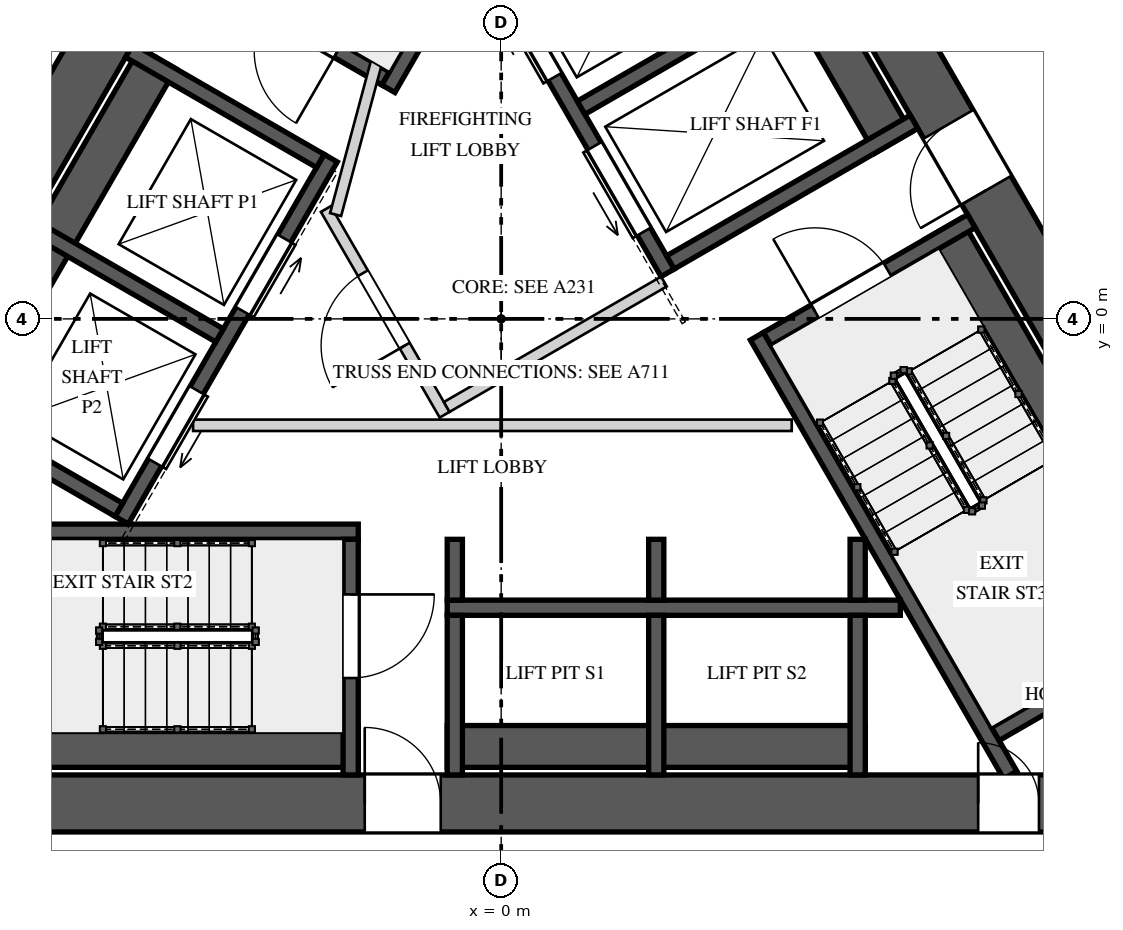
"""IFC4 building model, lengths in metres.
Left out: names, types, materials, properties, quantities, classifications, styles, units other than length and angle.
Written with IfcOpenShell. Run it as: python <this file> out.ifc"""

import sys

from ifc_helpers import new_model, si_unit, direction, frame, frame_2d, origin, place, context, subcontext, project, spatial, rectangle, extrude, element, fill, save


model = new_model("IFC4")
c1 = context("Model", 3, precision=1e-05, world=origin(), true_north=direction((0.0, 1.0)))
c2 = subcontext(c1, "Body", "Model", "MODEL_VIEW")
j1 = project(units=[si_unit("LENGTHUNIT", "METRE"), si_unit("PLANEANGLEUNIT", "RADIAN")], contexts=[c1])
p1 = place(None, origin())
s1 = spatial("IfcSite", under=j1, at=p1, CompositionType="ELEMENT")
p2 = place(p1, origin())
s2 = spatial("IfcBuilding", under=s1, at=p2, CompositionType="ELEMENT")
p3 = place(p2, frame((0.0, 0.0, 232.0)))
s3 = spatial("IfcBuildingStorey", under=s2, at=p3, CompositionType="ELEMENT", Elevation=232.0)
p4 = place(p3, frame((-1.227, 10.625, 0.0), z_axis=(0.0, 0.0, 1.0), x_axis=(-0.500002161919, -0.866024155596, 0.0)))
e1 = element("IfcWall", 1, at=p4, inside=s3, PredefinedType="SHEAR", context=c2, shape_type="SweptSolid", body=[
    extrude(rectangle(XDim=17.176, YDim=0.75, at=frame_2d((8.588, 0.0))), origin(), (0.0, 0.0, 1.0), 5.2),
])
p5 = place(p4, frame((6.793, 0.0, 0.0)))
e2 = element("IfcOpeningElement", 2, at=p5, cuts=e1, PredefinedType="OPENING", context=c2, shape_type="SweptSolid", body=[
    extrude(rectangle(XDim=1.0, YDim=2.4, at=frame_2d((0.5, 1.2))), frame((0.0, 0.385, 0.0), z_axis=(0.0, -1.0, 0.0), x_axis=(1.0, 0.0, 0.0)), (0.0, 0.0, 1.0), 0.77),
])
p6 = place(p3, frame((-8.588, -6.375, 0.0), z_axis=(0.0, 0.0, 1.0), x_axis=(1.0, 0.0, 0.0)))
e3 = element("IfcWall", 3, at=p6, inside=s3, PredefinedType="SHEAR", context=c2, shape_type="SweptSolid", body=[
    extrude(rectangle(XDim=17.176, YDim=0.75, at=frame_2d((8.588, 0.0))), origin(), (0.0, 0.0, 1.0), 5.2),
])
p7 = place(p6, frame((6.793, 0.0, 0.0)))
e4 = element("IfcOpeningElement", 4, at=p7, cuts=e3, PredefinedType="OPENING", context=c2, shape_type="SweptSolid", body=[
    extrude(rectangle(XDim=1.0, YDim=2.4, at=frame_2d((0.5, 1.2))), frame((0.0, 0.385, 0.0), z_axis=(0.0, -1.0, 0.0), x_axis=(1.0, 0.0, 0.0)), (0.0, 0.0, 1.0), 0.77),
])
p8 = place(p6, frame((14.864, 0.0, 0.0)))
e5 = element("IfcOpeningElement", 5, at=p8, cuts=e3, PredefinedType="OPENING", context=c2, shape_type="SweptSolid", body=[
    extrude(rectangle(XDim=0.8, YDim=2.1, at=frame_2d((0.4, 1.05))), frame((0.0, 0.385, 0.0), z_axis=(0.0, -1.0, 0.0), x_axis=(1.0, 0.0, 0.0)), (0.0, 0.0, 1.0), 0.77),
])
p9 = place(p3, frame((9.815, -4.25, 0.0), z_axis=(0.0, 0.0, 1.0), x_axis=(-0.500002161919, 0.866024155596, 0.0)))
e6 = element("IfcWall", 6, at=p9, inside=s3, PredefinedType="SHEAR", context=c2, shape_type="SweptSolid", body=[
    extrude(rectangle(XDim=17.176, YDim=0.75, at=frame_2d((8.588, 0.0))), origin(), (0.0, 0.0, 1.0), 5.2),
])
p10 = place(p9, frame((6.863, 0.0, 0.0)))
e7 = element("IfcOpeningElement", 7, at=p10, cuts=e6, PredefinedType="OPENING", context=c2, shape_type="SweptSolid", body=[
    extrude(rectangle(XDim=1.0, YDim=2.4, at=frame_2d((0.5, 1.2))), frame((0.0, 0.385, 0.0), z_axis=(0.0, -1.0, 0.0), x_axis=(1.0, 0.0, 0.0)), (0.0, 0.0, 1.0), 0.77),
])
p11 = place(p9, frame((14.382, 0.0, 0.0)))
e8 = element("IfcOpeningElement", 8, at=p11, cuts=e6, PredefinedType="OPENING", context=c2, shape_type="SweptSolid", body=[
    extrude(rectangle(XDim=0.8, YDim=2.1, at=frame_2d((0.4, 1.05))), frame((0.0, 0.385, 0.0), z_axis=(0.0, -1.0, 0.0), x_axis=(1.0, 0.0, 0.0)), (0.0, 0.0, 1.0), 0.77),
])
p12 = place(p3, frame((1.847, 8.8, 0.0), z_axis=(0.0, 0.0, 1.0), x_axis=(-0.499980354584, -0.866036745774, 0.0)))
e9 = element("IfcWall", 9, at=p12, inside=s3, PredefinedType="SOLIDWALL", context=c2, shape_type="SweptSolid", body=[
    extrude(rectangle(XDim=6.665, YDim=0.2, at=frame_2d((3.333, 0.0))), origin(), (0.0, 0.0, 1.0), 4.85),
])
p13 = place(p3, frame((-1.521, 3.165, 0.0), z_axis=(0.0, 0.0, 1.0), x_axis=(-0.86600983753, 0.500026960575, 0.0)))
e10 = element("IfcWall", 10, at=p13, inside=s3, PredefinedType="SOLIDWALL", context=c2, shape_type="SweptSolid", body=[
    extrude(rectangle(XDim=3.1, YDim=0.2, at=frame_2d((1.55, 0.0))), origin(), (0.0, 0.0, 1.0), 4.85),
])
p14 = place(p13, frame((0.725, 0.0, 0.0)))
e11 = element("IfcOpeningElement", 11, at=p14, cuts=e10, PredefinedType="OPENING", context=c2, shape_type="SweptSolid", body=[
    extrude(rectangle(XDim=1.1, YDim=2.4, at=frame_2d((0.55, 1.2))), frame((0.0, 0.11, 0.0), z_axis=(0.0, -1.0, 0.0), x_axis=(1.0, 0.0, 0.0)), (0.0, 0.0, 1.0), 0.22),
])
p15 = place(p3, frame((-8.08, -5.625, 0.0), z_axis=(0.0, 0.0, 1.0), x_axis=(1.0, 0.0, 0.0)))
e12 = element("IfcWall", 12, at=p15, inside=s3, PredefinedType="SOLIDWALL", context=c2, shape_type="SweptSolid", body=[
    extrude(rectangle(XDim=6.2, YDim=0.55, at=frame_2d((3.1, 0.0))), origin(), (0.0, 0.0, 1.0), 4.85),
])
p16 = place(p3, frame((-8.545, -2.8, 0.0), z_axis=(0.0, 0.0, 1.0), x_axis=(1.0, 0.0, 0.0)))
e13 = element("IfcWall", 13, at=p16, inside=s3, PredefinedType="SOLIDWALL", context=c2, shape_type="SweptSolid", body=[
    extrude(rectangle(XDim=6.665, YDim=0.2, at=frame_2d((3.333, 0.0))), origin(), (0.0, 0.0, 1.0), 4.85),
])
p17 = place(p3, frame((-1.98, -2.9, 0.0), z_axis=(0.0, 0.0, 1.0), x_axis=(0.0, -1.0, 0.0)))
e14 = element("IfcWall", 14, at=p17, inside=s3, PredefinedType="SOLIDWALL", context=c2, shape_type="SweptSolid", body=[
    extrude(rectangle(XDim=3.1, YDim=0.2, at=frame_2d((1.55, 0.0))), origin(), (0.0, 0.0, 1.0), 4.85),
])
p18 = place(p17, frame((0.725, 0.0, 0.0)))
e15 = element("IfcOpeningElement", 15, at=p18, cuts=e14, PredefinedType="OPENING", context=c2, shape_type="SweptSolid", body=[
    extrude(rectangle(XDim=1.1, YDim=2.4, at=frame_2d((0.55, 1.2))), frame((0.0, 0.11, 0.0), z_axis=(0.0, -1.0, 0.0), x_axis=(1.0, 0.0, 0.0)), (0.0, 0.0, 1.0), 0.22),
])
p19 = place(p3, frame((8.911, -4.185, 0.0), z_axis=(0.0, 0.0, 1.0), x_axis=(-0.500009909098, 0.866019682689, 0.0)))
e16 = element("IfcWall", 16, at=p19, inside=s3, PredefinedType="SOLIDWALL", context=c2, shape_type="SweptSolid", body=[
    extrude(rectangle(XDim=6.2, YDim=0.55, at=frame_2d((3.1, 0.0))), origin(), (0.0, 0.0, 1.0), 4.85),
])
p20 = place(p3, frame((6.697, -6.0, 0.0), z_axis=(0.0, 0.0, 1.0), x_axis=(-0.499980354584, 0.866036745774, 0.0)))
e17 = element("IfcWall", 17, at=p20, inside=s3, PredefinedType="SOLIDWALL", context=c2, shape_type="SweptSolid", body=[
    extrude(rectangle(XDim=6.665, YDim=0.2, at=frame_2d((3.333, 0.0))), origin(), (0.0, 0.0, 1.0), 4.85),
])
p21 = place(p3, frame((6.501, -5.461, 0.0), z_axis=(0.0, 0.0, 1.0), x_axis=(0.86600983753, 0.500026960575, 0.0)))
e18 = element("IfcWall", 18, at=p21, inside=s3, PredefinedType="SOLIDWALL", context=c2, shape_type="SweptSolid", body=[
    extrude(rectangle(XDim=3.1, YDim=0.2, at=frame_2d((1.55, 0.0))), origin(), (0.0, 0.0, 1.0), 4.85),
])
p22 = place(p3, frame((3.501, -0.265, 0.0), z_axis=(0.0, 0.0, 1.0), x_axis=(0.866043940782, 0.499967891604, 0.0)))
e19 = element("IfcWall", 19, at=p22, inside=s3, PredefinedType="SOLIDWALL", context=c2, shape_type="SweptSolid", body=[
    extrude(rectangle(XDim=3.1, YDim=0.2, at=frame_2d((1.55, 0.0))), origin(), (0.0, 0.0, 1.0), 4.85),
])
p23 = place(p22, frame((0.725, 0.0, 0.0)))
e20 = element("IfcOpeningElement", 20, at=p23, cuts=e19, PredefinedType="OPENING", context=c2, shape_type="SweptSolid", body=[
    extrude(rectangle(XDim=1.1, YDim=2.4, at=frame_2d((0.55, 1.2))), frame((0.0, 0.11, 0.0), z_axis=(0.0, -1.0, 0.0), x_axis=(1.0, 0.0, 0.0)), (0.0, 0.0, 1.0), 0.22),
])
p24 = place(p3, frame((-2.243, 2.115, 0.0), z_axis=(0.0, 0.0, 1.0), x_axis=(-0.499996545922, -0.866027397988, 0.0)))
e21 = element("IfcWall", 21, at=p24, inside=s3, PredefinedType="SOLIDWALL", context=c2, shape_type="SweptSolid", body=[
    extrude(rectangle(XDim=5.5, YDim=0.2, at=frame_2d((2.75, 0.0))), origin(), (0.0, 0.0, 1.0), 4.85),
])
p25 = place(p24, frame((1.22, 0.0, 0.0)))
e22 = element("IfcOpeningElement", 22, at=p25, cuts=e21, PredefinedType="OPENING", context=c2, shape_type="SweptSolid", body=[
    extrude(rectangle(XDim=1.1, YDim=2.1, at=frame_2d((0.55, 1.05))), frame((0.0, 0.11, 0.0), z_axis=(0.0, -1.0, 0.0), x_axis=(1.0, 0.0, 0.0)), (0.0, 0.0, 1.0), 0.22),
])
p26 = place(p24, frame((3.525, 0.0, 0.0)))
e23 = element("IfcOpeningElement", 23, at=p26, cuts=e21, PredefinedType="OPENING", context=c2, shape_type="SweptSolid", body=[
    extrude(rectangle(XDim=1.1, YDim=2.1, at=frame_2d((0.55, 1.05))), frame((0.0, 0.11, 0.0), z_axis=(0.0, -1.0, 0.0), x_axis=(1.0, 0.0, 0.0)), (0.0, 0.0, 1.0), 0.22),
])
p27 = place(p3, frame((-4.516, 3.427, 0.0), z_axis=(0.0, 0.0, 1.0), x_axis=(-0.499996545922, -0.866027397988, 0.0)))
e24 = element("IfcWall", 24, at=p27, inside=s3, PredefinedType="SOLIDWALL", context=c2, shape_type="SweptSolid", body=[
    extrude(rectangle(XDim=5.5, YDim=0.55, at=frame_2d((2.75, 0.0))), origin(), (0.0, 0.0, 1.0), 4.85),
])
p28 = place(p3, frame((-2.38, 2.078, 0.0), z_axis=(0.0, 0.0, 1.0), x_axis=(-0.866032775405, 0.499987231761, 0.0)))
e25 = element("IfcWall", 25, at=p28, inside=s3, PredefinedType="SOLIDWALL", context=c2, shape_type="SweptSolid", body=[
    extrude(rectangle(XDim=2.9, YDim=0.2, at=frame_2d((1.45, 0.0))), origin(), (0.0, 0.0, 1.0), 4.85),
])
p29 = place(p3, frame((-3.705, -0.217, 0.0), z_axis=(0.0, 0.0, 1.0), x_axis=(-0.865996321171, 0.50005036918, 0.0)))
e26 = element("IfcWall", 26, at=p29, inside=s3, PredefinedType="SOLIDWALL", context=c2, shape_type="SweptSolid", body=[
    extrude(rectangle(XDim=2.9, YDim=0.2, at=frame_2d((1.45, 0.0))), origin(), (0.0, 0.0, 1.0), 4.85),
])
p30 = place(p3, frame((-5.03, -2.512, 0.0), z_axis=(0.0, 0.0, 1.0), x_axis=(-0.866032775405, 0.499987231761, 0.0)))
e27 = element("IfcWall", 27, at=p30, inside=s3, PredefinedType="SOLIDWALL", context=c2, shape_type="SweptSolid", body=[
    extrude(rectangle(XDim=2.9, YDim=0.2, at=frame_2d((1.45, 0.0))), origin(), (0.0, 0.0, 1.0), 4.85),
])
p31 = place(p3, frame((-0.71, -3.8, 0.0), z_axis=(0.0, 0.0, 1.0), x_axis=(1.0, 0.0, 0.0)))
e28 = element("IfcWall", 28, at=p31, inside=s3, PredefinedType="SOLIDWALL", context=c2, shape_type="SweptSolid", body=[
    extrude(rectangle(XDim=5.961, YDim=0.2, at=frame_2d((2.981, 0.0))), origin(), (0.0, 0.0, 1.0), 4.85),
])
p32 = place(p3, frame((-0.71, -5.625, 0.0), z_axis=(0.0, 0.0, 1.0), x_axis=(1.0, 0.0, 0.0)))
e29 = element("IfcWall", 29, at=p32, inside=s3, PredefinedType="SOLIDWALL", context=c2, shape_type="SweptSolid", body=[
    extrude(rectangle(XDim=5.5, YDim=0.55, at=frame_2d((2.75, 0.0))), origin(), (0.0, 0.0, 1.0), 4.85),
])
p33 = place(p3, frame((-0.61, -3.9, 0.0), z_axis=(0.0, 0.0, 1.0), x_axis=(0.0, -1.0, 0.0)))
e30 = element("IfcWall", 30, at=p33, inside=s3, PredefinedType="SOLIDWALL", context=c2, shape_type="SweptSolid", body=[
    extrude(rectangle(XDim=2.1, YDim=0.2, at=frame_2d((1.05, 0.0))), origin(), (0.0, 0.0, 1.0), 4.85),
])
p34 = place(p3, frame((-0.61, -2.9, 0.0), z_axis=(0.0, 0.0, 1.0), x_axis=(0.0, -1.0, 0.0)))
e31 = element("IfcWall", 31, at=p34, inside=s3, PredefinedType="SOLIDWALL", context=c2, shape_type="SweptSolid", body=[
    extrude(rectangle(XDim=0.8, YDim=0.2, at=frame_2d((0.4, 0.0))), origin(), (0.0, 0.0, 1.0), 4.85),
])
p35 = place(p3, frame((2.04, -3.9, 0.0), z_axis=(0.0, 0.0, 1.0), x_axis=(0.0, -1.0, 0.0)))
e32 = element("IfcWall", 32, at=p35, inside=s3, PredefinedType="SOLIDWALL", context=c2, shape_type="SweptSolid", body=[
    extrude(rectangle(XDim=2.1, YDim=0.2, at=frame_2d((1.05, 0.0))), origin(), (0.0, 0.0, 1.0), 4.85),
])
p36 = place(p3, frame((2.04, -2.9, 0.0), z_axis=(0.0, 0.0, 1.0), x_axis=(0.0, -1.0, 0.0)))
e33 = element("IfcWall", 33, at=p36, inside=s3, PredefinedType="SOLIDWALL", context=c2, shape_type="SweptSolid", body=[
    extrude(rectangle(XDim=0.8, YDim=0.2, at=frame_2d((0.4, 0.0))), origin(), (0.0, 0.0, 1.0), 4.85),
])
p37 = place(p3, frame((4.69, -3.9, 0.0), z_axis=(0.0, 0.0, 1.0), x_axis=(0.0, -1.0, 0.0)))
e34 = element("IfcWall", 34, at=p37, inside=s3, PredefinedType="SOLIDWALL", context=c2, shape_type="SweptSolid", body=[
    extrude(rectangle(XDim=2.1, YDim=0.2, at=frame_2d((1.05, 0.0))), origin(), (0.0, 0.0, 1.0), 4.85),
])
p38 = place(p3, frame((4.69, -2.9, 0.0), z_axis=(0.0, 0.0, 1.0), x_axis=(0.0, -1.0, 0.0)))
e35 = element("IfcWall", 35, at=p38, inside=s3, PredefinedType="SOLIDWALL", context=c2, shape_type="SweptSolid", body=[
    extrude(rectangle(XDim=0.8, YDim=0.2, at=frame_2d((0.4, 0.0))), origin(), (0.0, 0.0, 1.0), 4.85),
])
p39 = place(p3, frame((2.19, 0.606, 0.0), z_axis=(0.0, 0.0, 1.0), x_axis=(-0.500002801628, 0.866023786258, 0.0)))
e36 = element("IfcWall", 36, at=p39, inside=s3, PredefinedType="SOLIDWALL", context=c2, shape_type="SweptSolid", body=[
    extrude(rectangle(XDim=4.9, YDim=0.2, at=frame_2d((2.45, 0.0))), origin(), (0.0, 0.0, 1.0), 4.85),
])
p40 = place(p39, frame((0.625, 0.0, 0.0)))
e37 = element("IfcOpeningElement", 37, at=p40, cuts=e36, PredefinedType="OPENING", context=c2, shape_type="SweptSolid", body=[
    extrude(rectangle(XDim=1.3, YDim=2.1, at=frame_2d((0.65, 1.05))), frame((0.0, 0.11, 0.0), z_axis=(0.0, -1.0, 0.0), x_axis=(1.0, 0.0, 0.0)), (0.0, 0.0, 1.0), 0.22),
])
p41 = place(p39, frame((2.975, 0.0, 0.0)))
e38 = element("IfcOpeningElement", 38, at=p41, cuts=e36, PredefinedType="OPENING", context=c2, shape_type="SweptSolid", body=[
    extrude(rectangle(XDim=1.3, YDim=2.1, at=frame_2d((0.65, 1.05))), frame((0.0, 0.11, 0.0), z_axis=(0.0, -1.0, 0.0), x_axis=(1.0, 0.0, 0.0)), (0.0, 0.0, 1.0), 0.22),
])
p42 = place(p3, frame((5.156, 2.319, 0.0), z_axis=(0.0, 0.0, 1.0), x_axis=(-0.500018594424, 0.866014668023, 0.0)))
e39 = element("IfcWall", 39, at=p42, inside=s3, PredefinedType="SOLIDWALL", context=c2, shape_type="SweptSolid", body=[
    extrude(rectangle(XDim=4.9, YDim=0.55, at=frame_2d((2.45, 0.0))), origin(), (0.0, 0.0, 1.0), 4.85),
])
for number, where, z_axis, x_axis in (
    (40, (2.227, 0.743, 0.0), (0.0, 0.0, 1.0), (0.866, 0.5, 0.0)),
    (41, (1.052, 2.778, 0.0), (0.0, 0.0, 1.0), (0.866, 0.5, 0.0)),
):
    element("IfcWall", number, at=place(p3, frame(where, z_axis=z_axis, x_axis=x_axis)), inside=s3, PredefinedType="SOLIDWALL", context=c2, shape_type="SweptSolid", body=[
        extrude(rectangle(XDim=3.7, YDim=0.2, at=frame_2d((1.85, 0.0))), origin(), (0.0, 0.0, 1.0), 4.85),
    ])
p43 = place(p3, frame((-0.744, -1.261, 0.0), z_axis=(0.0, 0.0, 1.0), x_axis=(-0.500004234368, 0.866022959057, 0.0)))
e42 = element("IfcWall", 42, at=p43, inside=s3, PredefinedType="PARTITIONING", context=c2, shape_type="SweptSolid", body=[
    extrude(rectangle(XDim=3.125, YDim=0.15, at=frame_2d((1.562, 0.0))), origin(), (0.0, 0.0, 1.0), 4.85),
])
p44 = place(p43, frame((1.05, 0.0, 0.0)))
e43 = element("IfcOpeningElement", 43, at=p44, cuts=e42, PredefinedType="OPENING", context=c2, shape_type="SweptSolid", body=[
    extrude(rectangle(XDim=1.1, YDim=2.4, at=frame_2d((0.55, 1.2))), frame((0.0, 0.085, 0.0), z_axis=(0.0, -1.0, 0.0), x_axis=(1.0, 0.0, 0.0)), (0.0, 0.0, 1.0), 0.17),
])
p45 = place(p3, frame((-0.717, -1.159, 0.0), z_axis=(0.0, 0.0, 1.0), x_axis=(0.866008176907, 0.50002983664, 0.0)))
e44 = element("IfcWall", 44, at=p45, inside=s3, PredefinedType="PARTITIONING", context=c2, shape_type="SweptSolid", body=[
    extrude(rectangle(XDim=3.3, YDim=0.15, at=frame_2d((1.65, 0.0))), origin(), (0.0, 0.0, 1.0), 4.85),
])
p46 = place(p3, frame((-2.178, 1.372, 0.0), z_axis=(0.0, 0.0, 1.0), x_axis=(0.258808958833, 0.96592852884, 0.0)))
e45 = element("IfcWall", 45, at=p46, inside=s3, PredefinedType="PARTITIONING", context=c2, shape_type="SweptSolid", body=[
    extrude(rectangle(XDim=2.903, YDim=0.15, at=frame_2d((1.451, 0.0))), origin(), (0.0, 0.0, 1.0), 4.85),
])
p47 = place(p3, frame((-4.053, -1.4, 0.0), z_axis=(0.0, 0.0, 1.0), x_axis=(1.0, 0.0, 0.0)))
e46 = element("IfcWall", 46, at=p47, inside=s3, PredefinedType="PARTITIONING", context=c2, shape_type="SweptSolid", body=[
    extrude(rectangle(XDim=7.876, YDim=0.15, at=frame_2d((3.938, 0.0))), origin(), (0.0, 0.0, 1.0), 4.85),
])
p48 = place(p3, frame((7.139, 6.135, 0.0), z_axis=(0.0, 0.0, 1.0), x_axis=(0.500006198144, -0.866021825255, 0.0)))
e47 = element("IfcWall", 47, at=p48, inside=s3, PredefinedType="SOLIDWALL", context=c2, shape_type="SweptSolid", body=[
    extrude(rectangle(XDim=5.636, YDim=0.2, at=frame_2d((2.818, 0.0))), origin(), (0.0, 0.0, 1.0), 4.85),
])
p49 = place(p48, frame((1.193, 0.0, 0.0)))
e48 = element("IfcOpeningElement", 48, at=p49, cuts=e47, PredefinedType="OPENING", context=c2, shape_type="SweptSolid", body=[
    extrude(rectangle(XDim=1.1, YDim=2.2, at=frame_2d((0.55, 1.1))), frame((0.0, 0.11, 0.0), z_axis=(0.0, -1.0, 0.0), x_axis=(1.0, 0.0, 0.0)), (0.0, 0.0, 1.0), 0.22),
])
p50 = place(p18, origin())
e49 = element("IfcDoor", 49, at=p50, inside=s3, OperationType="SINGLE_SWING_LEFT", PredefinedType="DOOR", context=c2, shape_type="SweptSolid", body=[
    extrude(rectangle(XDim=1.1, YDim=2.4, at=frame_2d((0.55, 1.2))), frame((0.0, 0.025, 0.0), z_axis=(0.0, -1.0, 0.0), x_axis=(1.0, 0.0, 0.0)), (0.0, 0.0, 1.0), 0.05),
])
fill(e15, e49)
p51 = place(p23, origin())
e50 = element("IfcDoor", 50, at=p51, inside=s3, OperationType="SINGLE_SWING_RIGHT", PredefinedType="DOOR", context=c2, shape_type="SweptSolid", body=[
    extrude(rectangle(XDim=1.1, YDim=2.4, at=frame_2d((0.55, 1.2))), frame((0.0, 0.025, 0.0), z_axis=(0.0, -1.0, 0.0), x_axis=(1.0, 0.0, 0.0)), (0.0, 0.0, 1.0), 0.05),
])
fill(e20, e50)
p52 = place(p25, origin())
e51 = element("IfcDoor", 51, at=p52, inside=s3, OperationType="SLIDING_TO_LEFT", PredefinedType="DOOR", context=c2, shape_type="SweptSolid", body=[
    extrude(rectangle(XDim=1.1, YDim=2.1, at=frame_2d((0.55, 1.05))), frame((0.0, 0.025, 0.0), z_axis=(0.0, -1.0, 0.0), x_axis=(1.0, 0.0, 0.0)), (0.0, 0.0, 1.0), 0.05),
])
fill(e22, e51)
p53 = place(p26, origin())
e52 = element("IfcDoor", 52, at=p53, inside=s3, OperationType="SLIDING_TO_RIGHT", PredefinedType="DOOR", context=c2, shape_type="SweptSolid", body=[
    extrude(rectangle(XDim=1.1, YDim=2.1, at=frame_2d((0.55, 1.05))), frame((0.0, 0.025, 0.0), z_axis=(0.0, -1.0, 0.0), x_axis=(1.0, 0.0, 0.0)), (0.0, 0.0, 1.0), 0.05),
])
fill(e23, e52)
p54 = place(p40, origin())
e53 = element("IfcDoor", 53, at=p54, inside=s3, OperationType="SLIDING_TO_LEFT", PredefinedType="DOOR", context=c2, shape_type="SweptSolid", body=[
    extrude(rectangle(XDim=1.3, YDim=2.1, at=frame_2d((0.65, 1.05))), frame((0.0, 0.025, 0.0), z_axis=(0.0, -1.0, 0.0), x_axis=(1.0, 0.0, 0.0)), (0.0, 0.0, 1.0), 0.05),
])
fill(e37, e53)
p55 = place(p41, origin())
e54 = element("IfcDoor", 54, at=p55, inside=s3, OperationType="SLIDING_TO_RIGHT", PredefinedType="DOOR", context=c2, shape_type="SweptSolid", body=[
    extrude(rectangle(XDim=1.3, YDim=2.1, at=frame_2d((0.65, 1.05))), frame((0.0, 0.025, 0.0), z_axis=(0.0, -1.0, 0.0), x_axis=(1.0, 0.0, 0.0)), (0.0, 0.0, 1.0), 0.05),
])
fill(e38, e54)
p56 = place(p44, origin())
e55 = element("IfcDoor", 55, at=p56, inside=s3, OperationType="SINGLE_SWING_LEFT", PredefinedType="DOOR", context=c2, shape_type="SweptSolid", body=[
    extrude(rectangle(XDim=1.1, YDim=2.4, at=frame_2d((0.55, 1.2))), frame((0.0, 0.025, 0.0), z_axis=(0.0, -1.0, 0.0), x_axis=(1.0, 0.0, 0.0)), (0.0, 0.0, 1.0), 0.05),
])
fill(e43, e55)
p57 = place(p7, origin())
e56 = element("IfcDoor", 56, at=p57, inside=s3, OperationType="SINGLE_SWING_LEFT", PredefinedType="DOOR", context=c2, shape_type="SweptSolid", body=[
    extrude(rectangle(XDim=1.0, YDim=2.4, at=frame_2d((0.5, 1.2))), frame((0.0, 0.025, 0.0), z_axis=(0.0, -1.0, 0.0), x_axis=(1.0, 0.0, 0.0)), (0.0, 0.0, 1.0), 0.05),
])
fill(e4, e56)
p58 = place(p10, origin())
e57 = element("IfcDoor", 57, at=p58, inside=s3, OperationType="SINGLE_SWING_RIGHT", PredefinedType="DOOR", context=c2, shape_type="SweptSolid", body=[
    extrude(rectangle(XDim=1.0, YDim=2.4, at=frame_2d((0.5, 1.2))), frame((0.0, 0.025, 0.0), z_axis=(0.0, -1.0, 0.0), x_axis=(1.0, 0.0, 0.0)), (0.0, 0.0, 1.0), 0.05),
])
fill(e7, e57)
p59 = place(p8, origin())
e58 = element("IfcDoor", 58, at=p59, inside=s3, OperationType="SINGLE_SWING_LEFT", PredefinedType="DOOR", context=c2, shape_type="SweptSolid", body=[
    extrude(rectangle(XDim=0.8, YDim=2.1, at=frame_2d((0.4, 1.05))), frame((0.0, 0.025, 0.0), z_axis=(0.0, -1.0, 0.0), x_axis=(1.0, 0.0, 0.0)), (0.0, 0.0, 1.0), 0.05),
])
fill(e5, e58)
save(model, sys.argv[1])
